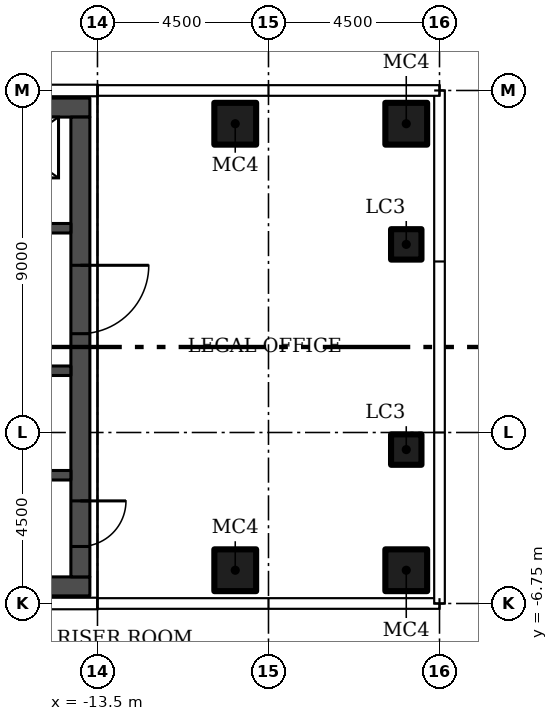
"""IFC4 building model, lengths in metres.
Left out: names, types, materials, properties, quantities, classifications, styles, units other than length and angle.
Written with IfcOpenShell. Run it as: python <this file> out.ifc"""

import sys

from ifc_helpers import new_model, si_unit, direction, frame, frame_2d, origin, origin_2d, place, context, subcontext, project, spatial, rectangle, hollow_rectangle, extrude, element, fill, save


model = new_model("IFC4")
c1 = context("Model", 3, precision=1e-05, world=origin(), true_north=direction((0.0, 1.0)))
c2 = subcontext(c1, "Body", "Model", "MODEL_VIEW")
j1 = project(units=[si_unit("LENGTHUNIT", "METRE"), si_unit("PLANEANGLEUNIT", "RADIAN")], contexts=[c1])
p1 = place(None, origin())
s1 = spatial("IfcSite", under=j1, at=p1, CompositionType="ELEMENT")
p2 = place(p1, origin())
s2 = spatial("IfcBuilding", under=s1, at=p2, CompositionType="ELEMENT")
p3 = place(p2, frame((0.0, 0.0, 170.1)))
s3 = spatial("IfcBuildingStorey", under=s2, at=p3, CompositionType="ELEMENT", Elevation=170.1)
for number, where in (
    (1, (-9.875, -5.875, 0.0)),
    (2, (-5.375, -5.875, 0.0)),
    (3, (-9.875, 5.875, 0.0)),
    (4, (-5.375, 5.875, 0.0)),
):
    element("IfcColumn", number, at=place(p3, frame(where)), inside=s3, PredefinedType="COLUMN", context=c2, shape_type="SweptSolid", body=[
        extrude(hollow_rectangle(XDim=1.1, YDim=1.1, WallThickness=0.04, at=origin_2d()), origin(), (0.0, 0.0, 1.0), 3.55),
    ])
for number, where in (
    (5, (-5.375, -2.7, 0.0)),
    (6, (-5.375, 2.7, 0.0)),
):
    element("IfcColumn", number, at=place(p3, frame(where)), inside=s3, PredefinedType="COLUMN", context=c2, shape_type="SweptSolid", body=[
        extrude(hollow_rectangle(XDim=0.8, YDim=0.8, WallThickness=0.03, at=origin_2d()), origin(), (0.0, 0.0, 1.0), 3.55),
    ])
for number, where in (
    (7, (-26.8, -6.3, 0.0)),
    (8, (-26.8, 6.3, 0.0)),
):
    element("IfcWall", number, at=place(p3, frame(where)), inside=s3, PredefinedType="SHEAR", context=c2, shape_type="SweptSolid", body=[
        extrude(rectangle(XDim=13.1, YDim=0.5, at=frame_2d((6.55, 0.0))), origin(), (0.0, 0.0, 1.0), 3.55),
    ])
p4 = place(p3, frame((-13.95, 6.05, 0.0), z_axis=(0.0, 0.0, 1.0), x_axis=(0.0, -1.0, 0.0)))
e9 = element("IfcWall", 9, at=p4, inside=s3, PredefinedType="SHEAR", context=c2, shape_type="SweptSolid", body=[
    extrude(rectangle(XDim=12.1, YDim=0.5, at=frame_2d((6.05, 0.0))), origin(), (0.0, 0.0, 1.0), 3.55),
])
p5 = place(p4, frame((10.1, 0.0, 0.0)))
e10 = element("IfcOpeningElement", 10, at=p5, cuts=e9, PredefinedType="OPENING", context=c2, shape_type="SweptSolid", body=[
    extrude(rectangle(XDim=1.2, YDim=2.1, at=frame_2d((0.6, 1.05))), frame((0.0, 0.26, 0.0), z_axis=(0.0, -1.0, 0.0), x_axis=(1.0, 0.0, 0.0)), (0.0, 0.0, 1.0), 0.52),
])
p6 = place(p4, frame((3.9, 0.0, 0.0)))
e11 = element("IfcOpeningElement", 11, at=p6, cuts=e9, PredefinedType="OPENING", context=c2, shape_type="SweptSolid", body=[
    extrude(rectangle(XDim=1.8, YDim=2.4, at=frame_2d((0.9, 1.2))), frame((0.0, 0.26, 0.0), z_axis=(0.0, -1.0, 0.0), x_axis=(1.0, 0.0, 0.0)), (0.0, 0.0, 1.0), 0.52),
])
p7 = place(p3, frame((-14.2, -3.375, 0.0), z_axis=(0.0, 0.0, 1.0), x_axis=(-1.0, 0.0, 0.0)))
e12 = element("IfcWall", 12, at=p7, inside=s3, PredefinedType="SHEAR", context=c2, shape_type="SweptSolid", body=[
    extrude(rectangle(XDim=12.1, YDim=0.25, at=frame_2d((6.05, 0.0))), origin(), (0.0, 0.0, 1.0), 3.55),
])
p8 = place(p7, frame((10.95, 0.0, 0.0)))
e13 = element("IfcOpeningElement", 13, at=p8, cuts=e12, PredefinedType="OPENING", context=c2, shape_type="SweptSolid", body=[
    extrude(rectangle(XDim=1.1, YDim=2.1, at=frame_2d((0.55, 1.05))), frame((0.0, 0.135, 0.0), z_axis=(0.0, -1.0, 0.0), x_axis=(1.0, 0.0, 0.0)), (0.0, 0.0, 1.0), 0.27),
])
p9 = place(p3, frame((-14.2, -0.625, 0.0), z_axis=(0.0, 0.0, 1.0), x_axis=(-1.0, 0.0, 0.0)))
e14 = element("IfcWall", 14, at=p9, inside=s3, PredefinedType="SHEAR", context=c2, shape_type="SweptSolid", body=[
    extrude(rectangle(XDim=12.1, YDim=0.25, at=frame_2d((6.05, 0.0))), origin(), (0.0, 0.0, 1.0), 3.55),
])
p10 = place(p9, frame((8.65, 0.0, 0.0)))
e15 = element("IfcOpeningElement", 15, at=p10, cuts=e14, PredefinedType="OPENING", context=c2, shape_type="SweptSolid", body=[
    extrude(rectangle(XDim=1.2, YDim=2.1, at=frame_2d((0.6, 1.05))), frame((0.0, 0.135, 0.0), z_axis=(0.0, -1.0, 0.0), x_axis=(1.0, 0.0, 0.0)), (0.0, 0.0, 1.0), 0.27),
])
p11 = place(p9, frame((1.175, 0.0, 0.0)))
e16 = element("IfcOpeningElement", 16, at=p11, cuts=e14, PredefinedType="OPENING", context=c2, shape_type="SweptSolid", body=[
    extrude(rectangle(XDim=0.9, YDim=2.1, at=frame_2d((0.45, 1.05))), frame((0.0, 0.135, 0.0), z_axis=(0.0, -1.0, 0.0), x_axis=(1.0, 0.0, 0.0)), (0.0, 0.0, 1.0), 0.27),
])
p12 = place(p3, frame((-26.3, 3.125, 0.0)))
e17 = element("IfcWall", 17, at=p12, inside=s3, PredefinedType="SHEAR", context=c2, shape_type="SweptSolid", body=[
    extrude(rectangle(XDim=12.1, YDim=0.25, at=frame_2d((6.05, 0.0))), origin(), (0.0, 0.0, 1.0), 3.55),
])
p13 = place(p12, frame((6.95, 0.0, 0.0)))
e18 = element("IfcOpeningElement", 18, at=p13, cuts=e17, PredefinedType="OPENING", context=c2, shape_type="SweptSolid", body=[
    extrude(rectangle(XDim=1.1, YDim=2.1, at=frame_2d((0.55, 1.05))), frame((0.0, 0.135, 0.0), z_axis=(0.0, -1.0, 0.0), x_axis=(1.0, 0.0, 0.0)), (0.0, 0.0, 1.0), 0.27),
])
p14 = place(p12, frame((10.075, 0.0, 0.0)))
e19 = element("IfcOpeningElement", 19, at=p14, cuts=e17, PredefinedType="OPENING", context=c2, shape_type="SweptSolid", body=[
    extrude(rectangle(XDim=1.1, YDim=2.1, at=frame_2d((0.55, 1.05))), frame((0.0, 0.135, 0.0), z_axis=(0.0, -1.0, 0.0), x_axis=(1.0, 0.0, 0.0)), (0.0, 0.0, 1.0), 0.27),
])
p15 = place(p12, frame((2.475, 0.0, 0.0)))
e20 = element("IfcOpeningElement", 20, at=p15, cuts=e17, PredefinedType="OPENING", context=c2, shape_type="SweptSolid", body=[
    extrude(rectangle(XDim=0.9, YDim=2.1, at=frame_2d((0.45, 1.05))), frame((0.0, 0.135, 0.0), z_axis=(0.0, -1.0, 0.0), x_axis=(1.0, 0.0, 0.0)), (0.0, 0.0, 1.0), 0.27),
])
p16 = place(p5, origin())
e21 = element("IfcDoor", 21, at=p16, inside=s3, OperationType="SINGLE_SWING_RIGHT", PredefinedType="DOOR", context=c2, shape_type="SweptSolid", body=[
    extrude(rectangle(XDim=1.2, YDim=2.1, at=frame_2d((0.6, 1.05))), frame((0.0, 0.025, 0.0), z_axis=(0.0, -1.0, 0.0), x_axis=(1.0, 0.0, 0.0)), (0.0, 0.0, 1.0), 0.05),
])
fill(e10, e21)
p17 = place(p6, origin())
e22 = element("IfcDoor", 22, at=p17, inside=s3, OperationType="DOUBLE_DOOR_SINGLE_SWING", PredefinedType="DOOR", context=c2, shape_type="SweptSolid", body=[
    extrude(rectangle(XDim=1.8, YDim=2.4, at=frame_2d((0.9, 1.2))), frame((0.0, 0.025, 0.0), z_axis=(0.0, -1.0, 0.0), x_axis=(1.0, 0.0, 0.0)), (0.0, 0.0, 1.0), 0.05),
])
fill(e11, e22)
save(model, sys.argv[1])
